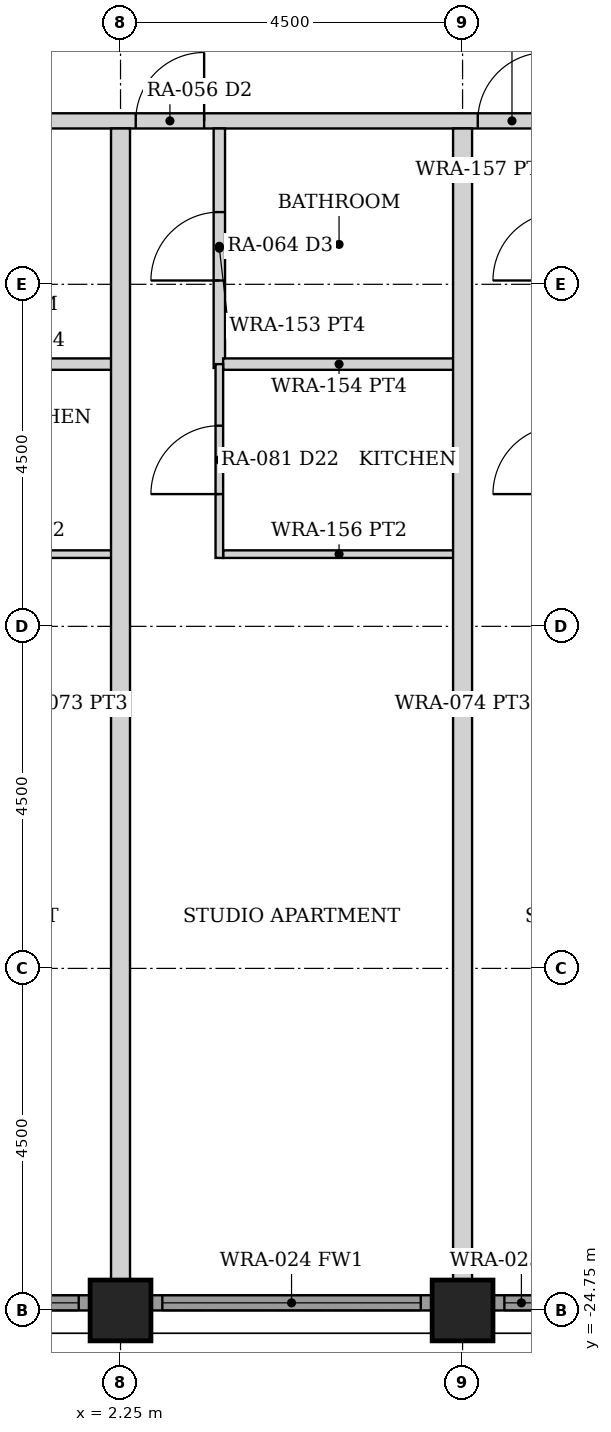
"""IFC4 building model, lengths in metres.
Left out: names, types, materials, properties, quantities, classifications, styles, units other than length and angle.
Written with IfcOpenShell. Run it as: python <this file> out.ifc"""

import sys

from ifc_helpers import new_model, si_unit, direction, frame, frame_2d, origin, origin_2d, place, context, subcontext, project, spatial, rectangle, hollow_rectangle, extrude, element, fill, save


model = new_model("IFC4")
c1 = context("Model", 3, precision=1e-05, world=origin(), true_north=direction((0.0, 1.0)))
c2 = subcontext(c1, "Body", "Model", "MODEL_VIEW")
j1 = project(units=[si_unit("LENGTHUNIT", "METRE"), si_unit("PLANEANGLEUNIT", "RADIAN")], contexts=[c1])
p1 = place(None, origin())
s1 = spatial("IfcSite", under=j1, at=p1, CompositionType="ELEMENT")
p2 = place(p1, origin())
s2 = spatial("IfcBuilding", under=s1, at=p2, CompositionType="ELEMENT")
p3 = place(p2, frame((0.0, 0.0, 30.0)))
s3 = spatial("IfcBuildingStorey", under=s2, at=p3, CompositionType="ELEMENT", Elevation=30.0)
for number, where, z_axis, x_axis in (
    (1, (2.25, -24.75, 0.0), (0.0, 0.0, 1.0), (0.0, 1.0, 0.0)),
    (2, (6.75, -24.75, 0.0), (0.0, 0.0, 1.0), (0.0, 1.0, 0.0)),
):
    element("IfcColumn", number, at=place(p3, frame(where, z_axis=z_axis, x_axis=x_axis)), inside=s3, PredefinedType="COLUMN", context=c2, shape_type="SweptSolid", body=[
        extrude(hollow_rectangle(XDim=0.8, YDim=0.8, WallThickness=0.08, at=origin_2d()), origin(), (0.0, 0.0, 1.0), 3.5),
    ])
p4 = place(p3, frame((-1.845, -24.65, 0.0), z_axis=(0.0, 0.0, 1.0), x_axis=(1.0, 0.0, 0.0)))
e3 = element("IfcWall", 3, at=p4, inside=s3, PredefinedType="SOLIDWALL", context=c2, shape_type="SweptSolid", body=[
    extrude(rectangle(XDim=3.69, YDim=0.2, at=frame_2d((1.845, 0.0))), origin(), (0.0, 0.0, 1.0), 2.379),
])
p5 = place(p4, frame((0.145, 0.0, 0.3)))
e4 = element("IfcOpeningElement", 4, at=p5, cuts=e3, PredefinedType="OPENING", context=c2, shape_type="SweptSolid", body=[
    extrude(rectangle(XDim=3.4, YDim=1.929, at=frame_2d((1.7, 0.964))), frame((0.0, 0.11, 0.0), z_axis=(0.0, -1.0, 0.0), x_axis=(1.0, 0.0, 0.0)), (0.0, 0.0, 1.0), 0.22),
])
p6 = place(p3, frame((2.655, -24.65, 0.0), z_axis=(0.0, 0.0, 1.0), x_axis=(1.0, 0.0, 0.0)))
e5 = element("IfcWall", 5, at=p6, inside=s3, PredefinedType="SOLIDWALL", context=c2, shape_type="SweptSolid", body=[
    extrude(rectangle(XDim=3.69, YDim=0.2, at=frame_2d((1.845, 0.0))), origin(), (0.0, 0.0, 1.0), 2.379),
])
p7 = place(p6, frame((0.145, 0.0, 0.3)))
e6 = element("IfcOpeningElement", 6, at=p7, cuts=e5, PredefinedType="OPENING", context=c2, shape_type="SweptSolid", body=[
    extrude(rectangle(XDim=3.4, YDim=1.929, at=frame_2d((1.7, 0.964))), frame((0.0, 0.11, 0.0), z_axis=(0.0, -1.0, 0.0), x_axis=(1.0, 0.0, 0.0)), (0.0, 0.0, 1.0), 0.22),
])
p8 = place(p3, frame((7.155, -24.65, 0.0), z_axis=(0.0, 0.0, 1.0), x_axis=(1.0, 0.0, 0.0)))
e7 = element("IfcWall", 7, at=p8, inside=s3, PredefinedType="SOLIDWALL", context=c2, shape_type="SweptSolid", body=[
    extrude(rectangle(XDim=3.69, YDim=0.2, at=frame_2d((1.845, 0.0))), origin(), (0.0, 0.0, 1.0), 2.379),
])
p9 = place(p8, frame((0.145, 0.0, 0.3)))
e8 = element("IfcOpeningElement", 8, at=p9, cuts=e7, PredefinedType="OPENING", context=c2, shape_type="SweptSolid", body=[
    extrude(rectangle(XDim=3.4, YDim=1.929, at=frame_2d((1.7, 0.964))), frame((0.0, 0.11, 0.0), z_axis=(0.0, -1.0, 0.0), x_axis=(1.0, 0.0, 0.0)), (0.0, 0.0, 1.0), 0.22),
])
p10 = place(p3, frame((-24.55, -9.1, 0.0), z_axis=(0.0, 0.0, 1.0), x_axis=(1.0, 0.0, 0.0)))
e9 = element("IfcWall", 9, at=p10, inside=s3, PredefinedType="PARTITIONING", context=c2, shape_type="SweptSolid", body=[
    extrude(rectangle(XDim=49.1, YDim=0.2, at=frame_2d((24.55, 0.0))), origin(), (0.0, 0.0, 1.0), 2.373),
])
p11 = place(p10, frame((5.1, 0.0, 0.0)))
e10 = element("IfcOpeningElement", 10, at=p11, cuts=e9, PredefinedType="OPENING", context=c2, shape_type="SweptSolid", body=[
    extrude(rectangle(XDim=0.9, YDim=2.1, at=frame_2d((0.45, 1.05))), frame((0.0, 0.11, 0.0), z_axis=(0.0, -1.0, 0.0), x_axis=(1.0, 0.0, 0.0)), (0.0, 0.0, 1.0), 0.22),
])
p12 = place(p10, frame((9.0, 0.0, 0.0)))
e11 = element("IfcOpeningElement", 11, at=p12, cuts=e9, PredefinedType="OPENING", context=c2, shape_type="SweptSolid", body=[
    extrude(rectangle(XDim=0.9, YDim=2.1, at=frame_2d((0.45, 1.05))), frame((0.0, 0.11, 0.0), z_axis=(0.0, -1.0, 0.0), x_axis=(1.0, 0.0, 0.0)), (0.0, 0.0, 1.0), 0.22),
])
p13 = place(p10, frame((13.5, 0.0, 0.0)))
e12 = element("IfcOpeningElement", 12, at=p13, cuts=e9, PredefinedType="OPENING", context=c2, shape_type="SweptSolid", body=[
    extrude(rectangle(XDim=0.9, YDim=2.1, at=frame_2d((0.45, 1.05))), frame((0.0, 0.11, 0.0), z_axis=(0.0, -1.0, 0.0), x_axis=(1.0, 0.0, 0.0)), (0.0, 0.0, 1.0), 0.22),
])
p14 = place(p10, frame((18.0, 0.0, 0.0)))
e13 = element("IfcOpeningElement", 13, at=p14, cuts=e9, PredefinedType="OPENING", context=c2, shape_type="SweptSolid", body=[
    extrude(rectangle(XDim=0.9, YDim=2.1, at=frame_2d((0.45, 1.05))), frame((0.0, 0.11, 0.0), z_axis=(0.0, -1.0, 0.0), x_axis=(1.0, 0.0, 0.0)), (0.0, 0.0, 1.0), 0.22),
])
p15 = place(p10, frame((22.5, 0.0, 0.0)))
e14 = element("IfcOpeningElement", 14, at=p15, cuts=e9, PredefinedType="OPENING", context=c2, shape_type="SweptSolid", body=[
    extrude(rectangle(XDim=0.9, YDim=2.1, at=frame_2d((0.45, 1.05))), frame((0.0, 0.11, 0.0), z_axis=(0.0, -1.0, 0.0), x_axis=(1.0, 0.0, 0.0)), (0.0, 0.0, 1.0), 0.22),
])
p16 = place(p10, frame((27.0, 0.0, 0.0)))
e15 = element("IfcOpeningElement", 15, at=p16, cuts=e9, PredefinedType="OPENING", context=c2, shape_type="SweptSolid", body=[
    extrude(rectangle(XDim=0.9, YDim=2.1, at=frame_2d((0.45, 1.05))), frame((0.0, 0.11, 0.0), z_axis=(0.0, -1.0, 0.0), x_axis=(1.0, 0.0, 0.0)), (0.0, 0.0, 1.0), 0.22),
])
p17 = place(p10, frame((31.5, 0.0, 0.0)))
e16 = element("IfcOpeningElement", 16, at=p17, cuts=e9, PredefinedType="OPENING", context=c2, shape_type="SweptSolid", body=[
    extrude(rectangle(XDim=0.9, YDim=2.1, at=frame_2d((0.45, 1.05))), frame((0.0, 0.11, 0.0), z_axis=(0.0, -1.0, 0.0), x_axis=(1.0, 0.0, 0.0)), (0.0, 0.0, 1.0), 0.22),
])
p18 = place(p10, frame((36.0, 0.0, 0.0)))
e17 = element("IfcOpeningElement", 17, at=p18, cuts=e9, PredefinedType="OPENING", context=c2, shape_type="SweptSolid", body=[
    extrude(rectangle(XDim=0.9, YDim=2.1, at=frame_2d((0.45, 1.05))), frame((0.0, 0.11, 0.0), z_axis=(0.0, -1.0, 0.0), x_axis=(1.0, 0.0, 0.0)), (0.0, 0.0, 1.0), 0.22),
])
p19 = place(p10, frame((43.1, 0.0, 0.0)))
e18 = element("IfcOpeningElement", 18, at=p19, cuts=e9, PredefinedType="OPENING", context=c2, shape_type="SweptSolid", body=[
    extrude(rectangle(XDim=0.9, YDim=2.1, at=frame_2d((0.45, 1.05))), frame((0.0, 0.11, 0.0), z_axis=(0.0, -1.0, 0.0), x_axis=(1.0, 0.0, 0.0)), (0.0, 0.0, 1.0), 0.22),
])
p20 = place(p3, frame((-0.9, -12.3, 0.0), z_axis=(0.0, 0.0, 1.0), x_axis=(1.0, 0.0, 0.0)))
e19 = element("IfcWall", 19, at=p20, inside=s3, PredefinedType="PARTITIONING", context=c2, shape_type="SweptSolid", body=[
    extrude(rectangle(XDim=3.05, YDim=0.15, at=frame_2d((1.525, 0.0))), origin(), (0.0, 0.0, 1.0), 2.373),
])
p21 = place(p3, frame((-0.9, -14.8, 0.0), z_axis=(0.0, 0.0, 1.0), x_axis=(1.0, 0.0, 0.0)))
e20 = element("IfcWall", 20, at=p21, inside=s3, PredefinedType="PARTITIONING", context=c2, shape_type="SweptSolid", body=[
    extrude(rectangle(XDim=3.05, YDim=0.1, at=frame_2d((1.525, 0.0))), origin(), (0.0, 0.0, 1.0), 2.373),
])
p22 = place(p3, frame((3.55, -12.35, 0.0), z_axis=(0.0, 0.0, 1.0), x_axis=(0.0, 1.0, 0.0)))
e21 = element("IfcWall", 21, at=p22, inside=s3, PredefinedType="PARTITIONING", context=c2, shape_type="SweptSolid", body=[
    extrude(rectangle(XDim=3.15, YDim=0.15, at=frame_2d((1.575, 0.0))), origin(), (0.0, 0.0, 1.0), 2.373),
])
p23 = place(p22, frame((1.15, 0.0, 0.0)))
e22 = element("IfcOpeningElement", 22, at=p23, cuts=e21, PredefinedType="OPENING", context=c2, shape_type="SweptSolid", body=[
    extrude(rectangle(XDim=0.9, YDim=2.1, at=frame_2d((0.45, 1.05))), frame((0.0, 0.085, 0.0), z_axis=(0.0, -1.0, 0.0), x_axis=(1.0, 0.0, 0.0)), (0.0, 0.0, 1.0), 0.17),
])
p24 = place(p3, frame((3.6, -12.3, 0.0), z_axis=(0.0, 0.0, 1.0), x_axis=(1.0, 0.0, 0.0)))
e23 = element("IfcWall", 23, at=p24, inside=s3, PredefinedType="PARTITIONING", context=c2, shape_type="SweptSolid", body=[
    extrude(rectangle(XDim=3.05, YDim=0.15, at=frame_2d((1.525, 0.0))), origin(), (0.0, 0.0, 1.0), 2.373),
])
p25 = place(p3, frame((3.6, -14.8, 0.0), z_axis=(0.0, 0.0, 1.0), x_axis=(1.0, 0.0, 0.0)))
e24 = element("IfcWall", 24, at=p25, inside=s3, PredefinedType="PARTITIONING", context=c2, shape_type="SweptSolid", body=[
    extrude(rectangle(XDim=3.05, YDim=0.1, at=frame_2d((1.525, 0.0))), origin(), (0.0, 0.0, 1.0), 2.373),
])
p26 = place(p3, frame((3.55, -14.85, 0.0), z_axis=(0.0, 0.0, 1.0), x_axis=(0.0, 1.0, 0.0)))
e25 = element("IfcWall", 25, at=p26, inside=s3, PredefinedType="PARTITIONING", context=c2, shape_type="SweptSolid", body=[
    extrude(rectangle(XDim=2.55, YDim=0.1, at=frame_2d((1.275, 0.0))), origin(), (0.0, 0.0, 1.0), 2.373),
])
p27 = place(p26, frame((0.84, 0.0, 0.0)))
e26 = element("IfcOpeningElement", 26, at=p27, cuts=e25, PredefinedType="OPENING", context=c2, shape_type="SweptSolid", body=[
    extrude(rectangle(XDim=0.9, YDim=2.1, at=frame_2d((0.45, 1.05))), frame((0.0, 0.06, 0.0), z_axis=(0.0, -1.0, 0.0), x_axis=(1.0, 0.0, 0.0)), (0.0, 0.0, 1.0), 0.12),
])
for number, where, z_axis, x_axis in (
    (27, (2.25, -24.35, 0.0), (0.0, 0.0, 1.0), (0.0, 1.0, 0.0)),
    (28, (6.75, -24.35, 0.0), (0.0, 0.0, 1.0), (0.0, 1.0, 0.0)),
):
    element("IfcWall", number, at=place(p3, frame(where, z_axis=z_axis, x_axis=x_axis)), inside=s3, PredefinedType="PARTITIONING", context=c2, shape_type="SweptSolid", body=[
        extrude(rectangle(XDim=15.15, YDim=0.25, at=frame_2d((7.575, 0.0))), origin(), (0.0, 0.0, 1.0), 2.373),
    ])
p28 = place(p5, origin())
e29 = element("IfcWindow", 29, at=p28, inside=s3, PartitioningType="SINGLE_PANEL", PredefinedType="WINDOW", context=c2, shape_type="SweptSolid", body=[
    extrude(rectangle(XDim=3.4, YDim=1.929, at=frame_2d((1.7, 0.964))), frame((0.0, 0.03, 0.0), z_axis=(0.0, -1.0, 0.0), x_axis=(1.0, 0.0, 0.0)), (0.0, 0.0, 1.0), 0.06),
])
fill(e4, e29)
p29 = place(p7, origin())
e30 = element("IfcWindow", 30, at=p29, inside=s3, PartitioningType="SINGLE_PANEL", PredefinedType="WINDOW", context=c2, shape_type="SweptSolid", body=[
    extrude(rectangle(XDim=3.4, YDim=1.929, at=frame_2d((1.7, 0.964))), frame((0.0, 0.03, 0.0), z_axis=(0.0, -1.0, 0.0), x_axis=(1.0, 0.0, 0.0)), (0.0, 0.0, 1.0), 0.06),
])
fill(e6, e30)
p30 = place(p9, origin())
e31 = element("IfcWindow", 31, at=p30, inside=s3, PartitioningType="SINGLE_PANEL", PredefinedType="WINDOW", context=c2, shape_type="SweptSolid", body=[
    extrude(rectangle(XDim=3.4, YDim=1.929, at=frame_2d((1.7, 0.964))), frame((0.0, 0.03, 0.0), z_axis=(0.0, -1.0, 0.0), x_axis=(1.0, 0.0, 0.0)), (0.0, 0.0, 1.0), 0.06),
])
fill(e8, e31)
p31 = place(p16, origin())
e32 = element("IfcDoor", 32, at=p31, inside=s3, OperationType="SINGLE_SWING_RIGHT", PredefinedType="DOOR", context=c2, shape_type="SweptSolid", body=[
    extrude(rectangle(XDim=0.9, YDim=2.1, at=frame_2d((0.45, 1.05))), frame((0.0, 0.025, 0.0), z_axis=(0.0, -1.0, 0.0), x_axis=(1.0, 0.0, 0.0)), (0.0, 0.0, 1.0), 0.05),
])
fill(e15, e32)
p32 = place(p23, origin())
e33 = element("IfcDoor", 33, at=p32, inside=s3, OperationType="SINGLE_SWING_LEFT", PredefinedType="DOOR", context=c2, shape_type="SweptSolid", body=[
    extrude(rectangle(XDim=0.9, YDim=2.1, at=frame_2d((0.45, 1.05))), frame((0.0, 0.025, 0.0), z_axis=(0.0, -1.0, 0.0), x_axis=(1.0, 0.0, 0.0)), (0.0, 0.0, 1.0), 0.05),
])
fill(e22, e33)
p33 = place(p27, origin())
e34 = element("IfcDoor", 34, at=p33, inside=s3, OperationType="SINGLE_SWING_LEFT", PredefinedType="DOOR", context=c2, shape_type="SweptSolid", body=[
    extrude(rectangle(XDim=0.9, YDim=2.1, at=frame_2d((0.45, 1.05))), frame((0.0, 0.025, 0.0), z_axis=(0.0, -1.0, 0.0), x_axis=(1.0, 0.0, 0.0)), (0.0, 0.0, 1.0), 0.05),
])
fill(e26, e34)
p34 = place(p17, origin())
e35 = element("IfcDoor", 35, at=p34, inside=s3, OperationType="SINGLE_SWING_RIGHT", PredefinedType="DOOR", context=c2, shape_type="SweptSolid", body=[
    extrude(rectangle(XDim=0.9, YDim=2.1, at=frame_2d((0.45, 1.05))), frame((0.0, 0.025, 0.0), z_axis=(0.0, -1.0, 0.0), x_axis=(1.0, 0.0, 0.0)), (0.0, 0.0, 1.0), 0.05),
])
fill(e16, e35)
save(model, sys.argv[1])
